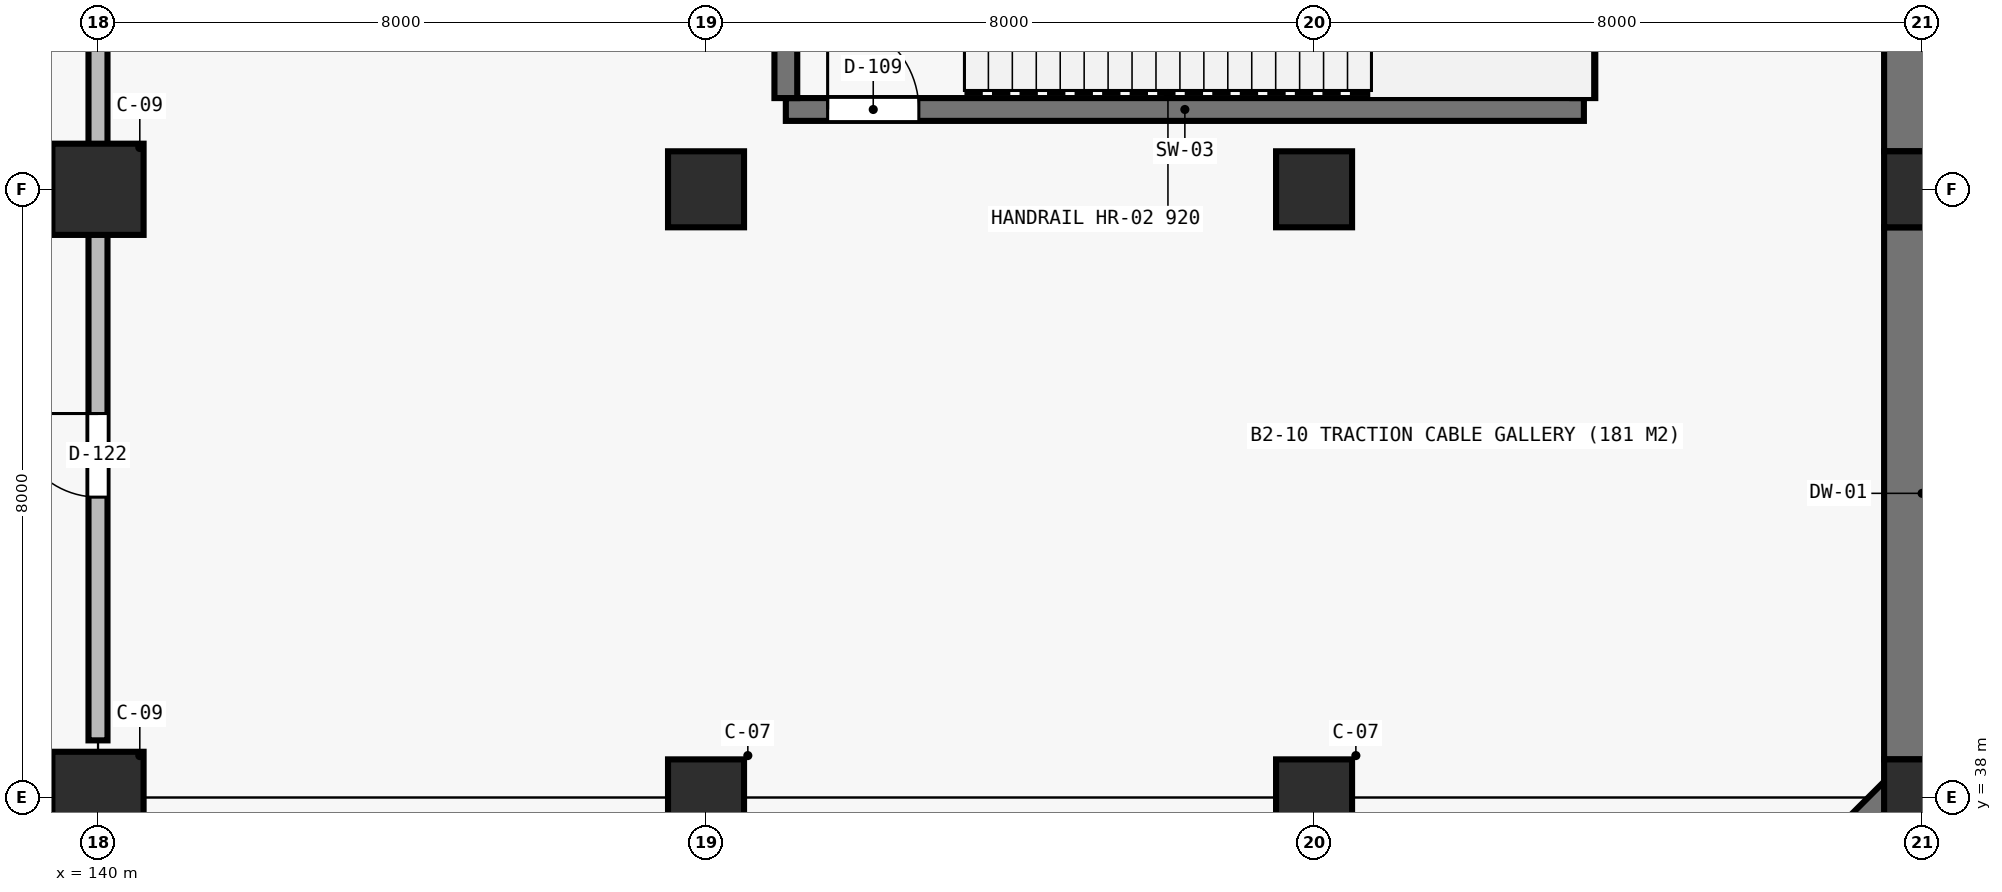
"""IFC4 building model, lengths in metres.
Left out: names, types, materials, properties, quantities, classifications, styles, units other than length and angle.
Written with IfcOpenShell. Run it as: python <this file> out.ifc"""

import sys

from ifc_helpers import new_model, si_unit, direction, frame, frame_2d, origin, origin_2d, place, context, subcontext, project, spatial, rectangle, extrude, element, fill, save


model = new_model("IFC4")
c1 = context("Model", 3, precision=1e-05, world=origin(), true_north=direction((0.0, 1.0)))
c2 = subcontext(c1, "Body", "Model", "MODEL_VIEW")
j1 = project(units=[si_unit("LENGTHUNIT", "METRE"), si_unit("PLANEANGLEUNIT", "RADIAN")], contexts=[c1])
p1 = place(None, origin())
s1 = spatial("IfcSite", under=j1, at=p1, CompositionType="ELEMENT")
p2 = place(p1, origin())
s2 = spatial("IfcBuilding", under=s1, at=p2, CompositionType="ELEMENT")
p3 = place(p2, frame((0.0, 0.0, -12.6)))
s3 = spatial("IfcBuildingStorey", under=s2, at=p3, CompositionType="ELEMENT", Elevation=-12.6)
for number, where, z_axis, x_axis in (
    (1, (140.0, 38.0, 0.0), (0.0, 0.0, 1.0), (1.0, 0.0, 0.0)),
    (2, (140.0, 46.0, 0.0), (0.0, 0.0, 1.0), (1.0, 0.0, 0.0)),
):
    element("IfcColumn", number, at=place(p3, frame(where, z_axis=z_axis, x_axis=x_axis)), inside=s3, PredefinedType="COLUMN", context=c2, shape_type="SweptSolid", body=[
        extrude(rectangle(XDim=1.2, YDim=1.2, at=origin_2d()), origin(), (0.0, 0.0, 1.0), 5.9),
    ])
for number, where, z_axis, x_axis in (
    (3, (148.0, 38.0, 0.0), (0.0, 0.0, 1.0), (1.0, 0.0, 0.0)),
    (4, (148.0, 46.0, 0.0), (0.0, 0.0, 1.0), (1.0, 0.0, 0.0)),
    (5, (156.0, 38.0, 0.0), (0.0, 0.0, 1.0), (1.0, 0.0, 0.0)),
    (6, (156.0, 46.0, 0.0), (0.0, 0.0, 1.0), (1.0, 0.0, 0.0)),
    (7, (164.0, 38.0, 0.0), (0.0, 0.0, 1.0), (1.0, 0.0, 0.0)),
    (8, (164.0, 46.0, 0.0), (0.0, 0.0, 1.0), (1.0, 0.0, 0.0)),
):
    element("IfcColumn", number, at=place(p3, frame(where, z_axis=z_axis, x_axis=x_axis)), inside=s3, PredefinedType="COLUMN", context=c2, shape_type="SweptSolid", body=[
        extrude(rectangle(XDim=1.0, YDim=1.0, at=origin_2d()), origin(), (0.0, 0.0, 1.0), 5.9),
    ])
p4 = place(p3, frame((156.146, 30.146, 0.0), z_axis=(0.0, 0.0, 1.0), x_axis=(0.707106781187, 0.707106781187, 0.0)))
e9 = element("IfcWall", 9, at=p4, inside=s3, PredefinedType="USERDEFINED", context=c2, shape_type="SweptSolid", body=[
    extrude(rectangle(XDim=10.899, YDim=1.0, at=frame_2d((5.45, 0.0))), origin(), (0.0, 0.0, 1.0), 5.9),
])
for number, where, z_axis, x_axis in (
    (10, (164.0, 38.5, 0.0), (0.0, 0.0, 1.0), (0.0, 1.0, 0.0)),
    (11, (164.0, 46.5, 0.0), (0.0, 0.0, 1.0), (0.0, 1.0, 0.0)),
):
    element("IfcWall", number, at=place(p3, frame(where, z_axis=z_axis, x_axis=x_axis)), inside=s3, PredefinedType="USERDEFINED", context=c2, shape_type="SweptSolid", body=[
        extrude(rectangle(XDim=7.0, YDim=1.0, at=frame_2d((3.5, 0.0))), origin(), (0.0, 0.0, 1.0), 5.9),
    ])
p5 = place(p3, frame((149.05, 47.05, 0.0), z_axis=(0.0, 0.0, 1.0), x_axis=(1.0, 0.0, 0.0)))
e12 = element("IfcWall", 12, at=p5, inside=s3, PredefinedType="SHEAR", context=c2, shape_type="SweptSolid", body=[
    extrude(rectangle(XDim=10.5, YDim=0.3, at=frame_2d((5.25, 0.0))), origin(), (0.0, 0.0, 1.0), 5.9),
])
p6 = place(p5, frame((0.55, 0.0, 0.0)))
e13 = element("IfcOpeningElement", 13, at=p6, cuts=e12, PredefinedType="OPENING", context=c2, shape_type="SweptSolid", body=[
    extrude(rectangle(XDim=1.2, YDim=2.2, at=frame_2d((0.6, 1.1))), frame((0.0, 0.16, 0.0), z_axis=(0.0, -1.0, 0.0), x_axis=(1.0, 0.0, 0.0)), (0.0, 0.0, 1.0), 0.32),
])
for number, where, z_axis, x_axis in (
    (14, (149.05, 47.2, 0.0), (0.0, 0.0, 1.0), (0.0, 1.0, 0.0)),
    (15, (159.55, 47.2, 0.0), (0.0, 0.0, 1.0), (0.0, 1.0, 0.0)),
):
    element("IfcWall", number, at=place(p3, frame(where, z_axis=z_axis, x_axis=x_axis)), inside=s3, PredefinedType="SHEAR", context=c2, shape_type="SweptSolid", body=[
        extrude(rectangle(XDim=5.2, YDim=0.3, at=frame_2d((2.6, 0.0))), origin(), (0.0, 0.0, 1.0), 5.9),
    ])
p7 = place(p3, frame((140.0, 38.75, 0.0), z_axis=(0.0, 0.0, 1.0), x_axis=(0.0, 1.0, 0.0)))
e16 = element("IfcWall", 16, at=p7, inside=s3, PredefinedType="SOLIDWALL", context=c2, shape_type="SweptSolid", body=[
    extrude(rectangle(XDim=22.5, YDim=0.25, at=frame_2d((11.25, 0.0))), origin(), (0.0, 0.0, 1.0), 4.7),
])
p8 = place(p7, frame((3.2, 0.0, 0.0)))
e17 = element("IfcOpeningElement", 17, at=p8, cuts=e16, PredefinedType="OPENING", context=c2, shape_type="SweptSolid", body=[
    extrude(rectangle(XDim=1.1, YDim=2.15, at=frame_2d((0.55, 1.075))), frame((0.0, 0.135, 0.0), z_axis=(0.0, -1.0, 0.0), x_axis=(1.0, 0.0, 0.0)), (0.0, 0.0, 1.0), 0.27),
])
p9 = place(p6, origin())
e18 = element("IfcDoor", 18, at=p9, inside=s3, OperationType="SINGLE_SWING_LEFT", PredefinedType="DOOR", context=c2, shape_type="SweptSolid", body=[
    extrude(rectangle(XDim=1.2, YDim=2.2, at=frame_2d((0.6, 1.1))), frame((0.0, 0.025, 0.0), z_axis=(0.0, -1.0, 0.0), x_axis=(1.0, 0.0, 0.0)), (0.0, 0.0, 1.0), 0.05),
])
fill(e13, e18)
p10 = place(p8, origin())
e19 = element("IfcDoor", 19, at=p10, inside=s3, OperationType="SINGLE_SWING_RIGHT", PredefinedType="DOOR", context=c2, shape_type="SweptSolid", body=[
    extrude(rectangle(XDim=1.1, YDim=2.15, at=frame_2d((0.55, 1.075))), frame((0.0, 0.025, 0.0), z_axis=(0.0, -1.0, 0.0), x_axis=(1.0, 0.0, 0.0)), (0.0, 0.0, 1.0), 0.05),
])
fill(e17, e19)
save(model, sys.argv[1])
